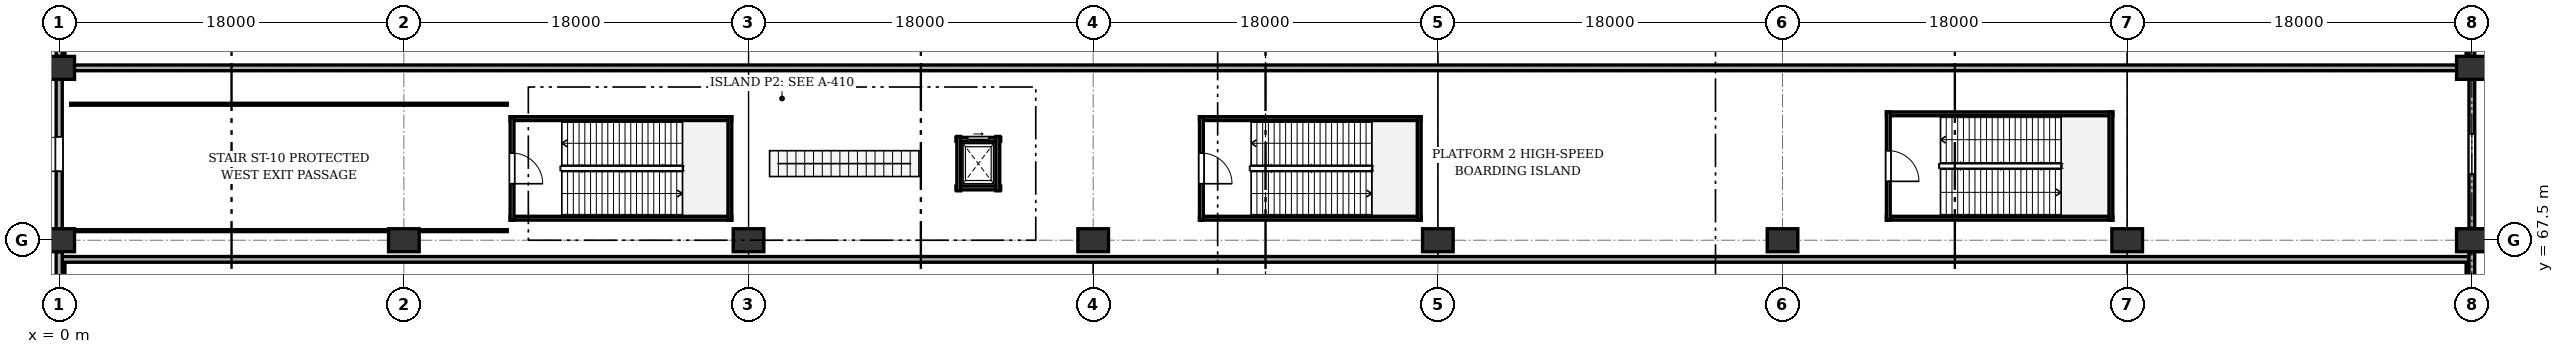
"""IFC4 building model, lengths in metres.
Left out: names, types, materials, properties, quantities, classifications, styles, units other than length and angle.
Written with IfcOpenShell. Run it as: python <this file> out.ifc"""

import sys

from ifc_helpers import new_model, si_unit, direction, frame, frame_2d, origin, origin_2d, place, context, subcontext, project, spatial, rectangle, extrude, element, fill, save


model = new_model("IFC4")
c1 = context("Model", 3, precision=1e-05, world=origin(), true_north=direction((0.0, 1.0)))
c2 = subcontext(c1, "Body", "Model", "MODEL_VIEW")
j1 = project(units=[si_unit("LENGTHUNIT", "METRE"), si_unit("PLANEANGLEUNIT", "RADIAN")], contexts=[c1])
p1 = place(None, origin())
s1 = spatial("IfcSite", under=j1, at=p1, CompositionType="ELEMENT")
p2 = place(p1, origin())
s2 = spatial("IfcBuilding", under=s1, at=p2, CompositionType="ELEMENT")
p3 = place(p2, origin())
s3 = spatial("IfcBuildingStorey", under=s2, at=p3, CompositionType="ELEMENT", Elevation=0.0)
for number, where, z_axis, x_axis in (
    (1, (0.0, 67.5, 0.0), (0.0, 0.0, 1.0), (1.0, 0.0, 0.0)),
    (2, (0.0, 76.5, 0.0), (0.0, 0.0, 1.0), (1.0, 0.0, 0.0)),
    (3, (18.0, 67.5, 0.0), (0.0, 0.0, 1.0), (1.0, 0.0, 0.0)),
    (4, (36.0, 67.5, 0.0), (0.0, 0.0, 1.0), (1.0, 0.0, 0.0)),
    (5, (54.0, 67.5, 0.0), (0.0, 0.0, 1.0), (1.0, 0.0, 0.0)),
    (6, (72.0, 67.5, 0.0), (0.0, 0.0, 1.0), (1.0, 0.0, 0.0)),
    (7, (90.0, 67.5, 0.0), (0.0, 0.0, 1.0), (1.0, 0.0, 0.0)),
    (8, (108.0, 67.5, 0.0), (0.0, 0.0, 1.0), (1.0, 0.0, 0.0)),
    (9, (126.0, 67.5, 0.0), (0.0, 0.0, 1.0), (1.0, 0.0, 0.0)),
    (10, (126.0, 76.5, 0.0), (0.0, 0.0, 1.0), (1.0, 0.0, 0.0)),
):
    element("IfcColumn", number, at=place(p3, frame(where, z_axis=z_axis, x_axis=x_axis)), inside=s3, PredefinedType="COLUMN", context=c2, shape_type="SweptSolid", body=[
        extrude(rectangle(XDim=1.6, YDim=1.2, at=origin_2d()), origin(), (0.0, 0.0, 1.0), 6.6),
    ])
p4 = place(p3, frame((0.15, 62.5, -1.25), z_axis=(0.0, 0.0, 1.0), x_axis=(0.0, 1.0, 0.0)))
e11 = element("IfcWall", 11, at=p4, inside=s3, PredefinedType="SOLIDWALL", context=c2, shape_type="SweptSolid", body=[
    extrude(rectangle(XDim=4.0, YDim=0.3, at=frame_2d((2.0, 0.0))), origin(), (0.0, 0.0, 1.0), 1.23),
])
p5 = place(p3, frame((0.15, 76.5, -1.25), z_axis=(0.0, 0.0, 1.0), x_axis=(0.0, 1.0, 0.0)))
e12 = element("IfcWall", 12, at=p5, inside=s3, PredefinedType="SOLIDWALL", context=c2, shape_type="SweptSolid", body=[
    extrude(rectangle(XDim=18.0, YDim=0.3, at=frame_2d((9.0, 0.0))), origin(), (0.0, 0.0, 1.0), 0.52),
])
p6 = place(p3, frame((125.85, 62.5, -1.25), z_axis=(0.0, 0.0, 1.0), x_axis=(0.0, 1.0, 0.0)))
e13 = element("IfcWall", 13, at=p6, inside=s3, PredefinedType="SOLIDWALL", context=c2, shape_type="SweptSolid", body=[
    extrude(rectangle(XDim=4.0, YDim=0.3, at=frame_2d((2.0, 0.0))), origin(), (0.0, 0.0, 1.0), 1.23),
])
p7 = place(p3, frame((125.85, 76.5, -1.25), z_axis=(0.0, 0.0, 1.0), x_axis=(0.0, 1.0, 0.0)))
e14 = element("IfcWall", 14, at=p7, inside=s3, PredefinedType="SOLIDWALL", context=c2, shape_type="SweptSolid", body=[
    extrude(rectangle(XDim=18.0, YDim=0.3, at=frame_2d((9.0, 0.0))), origin(), (0.0, 0.0, 1.0), 0.52),
])
for number, where, z_axis, x_axis in (
    (15, (0.15, 66.5, -1.25), (0.0, 0.0, 1.0), (1.0, 0.0, 0.0)),
    (16, (0.15, 76.5, -1.25), (0.0, 0.0, 1.0), (1.0, 0.0, 0.0)),
):
    element("IfcWall", number, at=place(p3, frame(where, z_axis=z_axis, x_axis=x_axis)), inside=s3, PredefinedType="SOLIDWALL", context=c2, shape_type="SweptSolid", body=[
        extrude(rectangle(XDim=125.7, YDim=0.3, at=frame_2d((62.85, 0.0))), origin(), (0.0, 0.0, 1.0), 0.87),
    ])
p8 = place(p3, frame((0.0, 54.6, 0.0), z_axis=(0.0, 0.0, 1.0), x_axis=(0.0, 1.0, 0.0)))
e17 = element("IfcWall", 17, at=p8, inside=s3, PredefinedType="SOLIDWALL", context=c2, shape_type="SweptSolid", body=[
    extrude(rectangle(XDim=12.3, YDim=0.32, at=frame_2d((6.15, 0.0))), origin(), (0.0, 0.0, 1.0), 5.495),
])
p9 = place(p8, frame((3.167, 0.0, 0.0)))
e18 = element("IfcOpeningElement", 18, at=p9, cuts=e17, PredefinedType="OPENING", context=c2, shape_type="SweptSolid", body=[
    extrude(rectangle(XDim=2.0, YDim=2.4, at=frame_2d((1.0, 1.2))), frame((0.0, 0.17, 0.0), z_axis=(0.0, -1.0, 0.0), x_axis=(1.0, 0.0, 0.0)), (0.0, 0.0, 1.0), 0.34),
])
p10 = place(p8, frame((7.333, 0.0, 0.95)))
e19 = element("IfcOpeningElement", 19, at=p10, cuts=e17, PredefinedType="OPENING", context=c2, shape_type="SweptSolid", body=[
    extrude(rectangle(XDim=1.6, YDim=1.9, at=frame_2d((0.8, 0.95))), frame((0.0, 0.17, 0.0), z_axis=(0.0, -1.0, 0.0), x_axis=(1.0, 0.0, 0.0)), (0.0, 0.0, 1.0), 0.34),
])
p11 = place(p3, frame((0.0, 68.1, 0.0), z_axis=(0.0, 0.0, 1.0), x_axis=(0.0, 1.0, 0.0)))
e20 = element("IfcWall", 20, at=p11, inside=s3, PredefinedType="SOLIDWALL", context=c2, shape_type="SweptSolid", body=[
    extrude(rectangle(XDim=7.8, YDim=0.32, at=frame_2d((3.9, 0.0))), origin(), (0.0, 0.0, 1.0), 5.495),
])
p12 = place(p11, frame((3.0, 0.0, 0.0)))
e21 = element("IfcOpeningElement", 21, at=p12, cuts=e20, PredefinedType="OPENING", context=c2, shape_type="SweptSolid", body=[
    extrude(rectangle(XDim=1.8, YDim=2.35, at=frame_2d((0.9, 1.175))), frame((0.0, 0.17, 0.0), z_axis=(0.0, -1.0, 0.0), x_axis=(1.0, 0.0, 0.0)), (0.0, 0.0, 1.0), 0.34),
])
p13 = place(p3, frame((0.0, 77.1, 0.0), z_axis=(0.0, 0.0, 1.0), x_axis=(0.0, 1.0, 0.0)))
e22 = element("IfcWall", 22, at=p13, inside=s3, PredefinedType="SOLIDWALL", context=c2, shape_type="SweptSolid", body=[
    extrude(rectangle(XDim=7.8, YDim=0.32, at=frame_2d((3.9, 0.0))), origin(), (0.0, 0.0, 1.0), 5.495),
])
p14 = place(p13, frame((2.4, 0.0, 0.95)))
e23 = element("IfcOpeningElement", 23, at=p14, cuts=e22, PredefinedType="OPENING", context=c2, shape_type="SweptSolid", body=[
    extrude(rectangle(XDim=3.0, YDim=2.1, at=frame_2d((1.5, 1.05))), frame((0.0, 0.17, 0.0), z_axis=(0.0, -1.0, 0.0), x_axis=(1.0, 0.0, 0.0)), (0.0, 0.0, 1.0), 0.34),
])
p15 = place(p3, frame((126.0, 66.9, 0.0), z_axis=(0.0, 0.0, 1.0), x_axis=(0.0, -1.0, 0.0)))
e24 = element("IfcWall", 24, at=p15, inside=s3, PredefinedType="SOLIDWALL", context=c2, shape_type="SweptSolid", body=[
    extrude(rectangle(XDim=12.3, YDim=0.3, at=frame_2d((6.15, 0.0))), origin(), (0.0, 0.0, 1.0), 5.495),
])
p16 = place(p15, frame((2.817, 0.0, 0.95)))
e25 = element("IfcOpeningElement", 25, at=p16, cuts=e24, PredefinedType="OPENING", context=c2, shape_type="SweptSolid", body=[
    extrude(rectangle(XDim=2.7, YDim=2.1, at=frame_2d((1.35, 1.05))), frame((0.0, 0.16, 0.0), z_axis=(0.0, -1.0, 0.0), x_axis=(1.0, 0.0, 0.0)), (0.0, 0.0, 1.0), 0.32),
])
p17 = place(p15, frame((6.933, 0.0, 0.95)))
e26 = element("IfcOpeningElement", 26, at=p17, cuts=e24, PredefinedType="OPENING", context=c2, shape_type="SweptSolid", body=[
    extrude(rectangle(XDim=2.4, YDim=2.1, at=frame_2d((1.2, 1.05))), frame((0.0, 0.16, 0.0), z_axis=(0.0, -1.0, 0.0), x_axis=(1.0, 0.0, 0.0)), (0.0, 0.0, 1.0), 0.32),
])
p18 = place(p3, frame((126.0, 75.9, 0.0), z_axis=(0.0, 0.0, 1.0), x_axis=(0.0, -1.0, 0.0)))
e27 = element("IfcWall", 27, at=p18, inside=s3, PredefinedType="SOLIDWALL", context=c2, shape_type="SweptSolid", body=[
    extrude(rectangle(XDim=7.8, YDim=0.3, at=frame_2d((3.9, 0.0))), origin(), (0.0, 0.0, 1.0), 5.495),
])
p19 = place(p18, frame((2.85, 0.0, 0.95)))
e28 = element("IfcOpeningElement", 28, at=p19, cuts=e27, PredefinedType="OPENING", context=c2, shape_type="SweptSolid", body=[
    extrude(rectangle(XDim=2.1, YDim=2.0, at=frame_2d((1.05, 1.0))), frame((0.0, 0.16, 0.0), z_axis=(0.0, -1.0, 0.0), x_axis=(1.0, 0.0, 0.0)), (0.0, 0.0, 1.0), 0.32),
])
p20 = place(p3, frame((126.0, 84.9, 0.0), z_axis=(0.0, 0.0, 1.0), x_axis=(0.0, -1.0, 0.0)))
e29 = element("IfcWall", 29, at=p20, inside=s3, PredefinedType="SOLIDWALL", context=c2, shape_type="SweptSolid", body=[
    extrude(rectangle(XDim=7.8, YDim=0.3, at=frame_2d((3.9, 0.0))), origin(), (0.0, 0.0, 1.0), 5.495),
])
p21 = place(p20, frame((3.0, 0.0, 0.95)))
e30 = element("IfcOpeningElement", 30, at=p21, cuts=e29, PredefinedType="OPENING", context=c2, shape_type="SweptSolid", body=[
    extrude(rectangle(XDim=1.8, YDim=2.0, at=frame_2d((0.9, 1.0))), frame((0.0, 0.16, 0.0), z_axis=(0.0, -1.0, 0.0), x_axis=(1.0, 0.0, 0.0)), (0.0, 0.0, 1.0), 0.32),
])
for number, where, z_axis, x_axis in (
    (31, (23.55, 68.65, 0.0), (0.0, 0.0, 1.0), (1.0, 0.0, 0.0)),
    (32, (35.125, 73.85, 0.0), (0.0, 0.0, 1.0), (-1.0, 0.0, 0.0)),
):
    element("IfcWall", number, at=place(p3, frame(where, z_axis=z_axis, x_axis=x_axis)), inside=s3, PredefinedType="SOLIDWALL", context=c2, shape_type="SweptSolid", body=[
        extrude(rectangle(XDim=11.575, YDim=0.2, at=frame_2d((5.788, 0.0))), origin(), (0.0, 0.0, 1.0), 6.32),
    ])
p22 = place(p3, frame((35.025, 68.55, 0.0), z_axis=(0.0, 0.0, 1.0), x_axis=(0.0, 1.0, 0.0)))
e33 = element("IfcWall", 33, at=p22, inside=s3, PredefinedType="SOLIDWALL", context=c2, shape_type="SweptSolid", body=[
    extrude(rectangle(XDim=5.4, YDim=0.2, at=frame_2d((2.7, 0.0))), origin(), (0.0, 0.0, 1.0), 6.32),
])
p23 = place(p3, frame((23.65, 73.95, 0.0), z_axis=(0.0, 0.0, 1.0), x_axis=(0.0, -1.0, 0.0)))
e34 = element("IfcWall", 34, at=p23, inside=s3, PredefinedType="SOLIDWALL", context=c2, shape_type="SweptSolid", body=[
    extrude(rectangle(XDim=5.4, YDim=0.2, at=frame_2d((2.7, 0.0))), origin(), (0.0, 0.0, 1.0), 4.4),
])
p24 = place(p23, frame((1.9, 0.0, 0.0)))
e35 = element("IfcOpeningElement", 35, at=p24, cuts=e34, PredefinedType="OPENING", context=c2, shape_type="SweptSolid", body=[
    extrude(rectangle(XDim=1.6, YDim=2.15, at=frame_2d((0.8, 1.075))), frame((0.0, 0.11, 0.0), z_axis=(0.0, -1.0, 0.0), x_axis=(1.0, 0.0, 0.0)), (0.0, 0.0, 1.0), 0.22),
])
for number, where, z_axis, x_axis in (
    (36, (59.55, 68.65, 0.0), (0.0, 0.0, 1.0), (1.0, 0.0, 0.0)),
    (37, (71.125, 73.85, 0.0), (0.0, 0.0, 1.0), (-1.0, 0.0, 0.0)),
):
    element("IfcWall", number, at=place(p3, frame(where, z_axis=z_axis, x_axis=x_axis)), inside=s3, PredefinedType="SOLIDWALL", context=c2, shape_type="SweptSolid", body=[
        extrude(rectangle(XDim=11.575, YDim=0.2, at=frame_2d((5.788, 0.0))), origin(), (0.0, 0.0, 1.0), 6.32),
    ])
p25 = place(p3, frame((71.025, 68.55, 0.0), z_axis=(0.0, 0.0, 1.0), x_axis=(0.0, 1.0, 0.0)))
e38 = element("IfcWall", 38, at=p25, inside=s3, PredefinedType="SOLIDWALL", context=c2, shape_type="SweptSolid", body=[
    extrude(rectangle(XDim=5.4, YDim=0.2, at=frame_2d((2.7, 0.0))), origin(), (0.0, 0.0, 1.0), 6.32),
])
p26 = place(p3, frame((59.65, 73.95, 0.0), z_axis=(0.0, 0.0, 1.0), x_axis=(0.0, -1.0, 0.0)))
e39 = element("IfcWall", 39, at=p26, inside=s3, PredefinedType="SOLIDWALL", context=c2, shape_type="SweptSolid", body=[
    extrude(rectangle(XDim=5.4, YDim=0.2, at=frame_2d((2.7, 0.0))), origin(), (0.0, 0.0, 1.0), 4.4),
])
p27 = place(p26, frame((1.9, 0.0, 0.0)))
e40 = element("IfcOpeningElement", 40, at=p27, cuts=e39, PredefinedType="OPENING", context=c2, shape_type="SweptSolid", body=[
    extrude(rectangle(XDim=1.6, YDim=2.15, at=frame_2d((0.8, 1.075))), frame((0.0, 0.11, 0.0), z_axis=(0.0, -1.0, 0.0), x_axis=(1.0, 0.0, 0.0)), (0.0, 0.0, 1.0), 0.22),
])
for number, where, z_axis, x_axis in (
    (41, (95.425, 68.65, 0.0), (0.0, 0.0, 1.0), (1.0, 0.0, 0.0)),
    (42, (107.25, 74.1, 0.0), (0.0, 0.0, 1.0), (-1.0, 0.0, 0.0)),
):
    element("IfcWall", number, at=place(p3, frame(where, z_axis=z_axis, x_axis=x_axis)), inside=s3, PredefinedType="SOLIDWALL", context=c2, shape_type="SweptSolid", body=[
        extrude(rectangle(XDim=11.825, YDim=0.2, at=frame_2d((5.913, 0.0))), origin(), (0.0, 0.0, 1.0), 6.32),
    ])
p28 = place(p3, frame((107.15, 68.55, 0.0), z_axis=(0.0, 0.0, 1.0), x_axis=(0.0, 1.0, 0.0)))
e43 = element("IfcWall", 43, at=p28, inside=s3, PredefinedType="SOLIDWALL", context=c2, shape_type="SweptSolid", body=[
    extrude(rectangle(XDim=5.65, YDim=0.2, at=frame_2d((2.825, 0.0))), origin(), (0.0, 0.0, 1.0), 6.32),
])
p29 = place(p3, frame((95.525, 74.2, 0.0), z_axis=(0.0, 0.0, 1.0), x_axis=(0.0, -1.0, 0.0)))
e44 = element("IfcWall", 44, at=p29, inside=s3, PredefinedType="SOLIDWALL", context=c2, shape_type="SweptSolid", body=[
    extrude(rectangle(XDim=5.65, YDim=0.2, at=frame_2d((2.825, 0.0))), origin(), (0.0, 0.0, 1.0), 4.4),
])
p30 = place(p29, frame((2.025, 0.0, 0.0)))
e45 = element("IfcOpeningElement", 45, at=p30, cuts=e44, PredefinedType="OPENING", context=c2, shape_type="SweptSolid", body=[
    extrude(rectangle(XDim=1.6, YDim=2.15, at=frame_2d((0.8, 1.075))), frame((0.0, 0.11, 0.0), z_axis=(0.0, -1.0, 0.0), x_axis=(1.0, 0.0, 0.0)), (0.0, 0.0, 1.0), 0.22),
])
p31 = place(p3, frame((46.83, 70.23, 0.0), z_axis=(0.0, 0.0, 1.0), x_axis=(1.0, 0.0, 0.0)))
e46 = element("IfcWall", 46, at=p31, inside=s3, PredefinedType="SOLIDWALL", context=c2, shape_type="SweptSolid", body=[
    extrude(rectangle(XDim=2.34, YDim=0.2, at=frame_2d((1.17, 0.0))), origin(), (0.0, 0.0, 1.0), 4.4),
])
p32 = place(p3, frame((49.17, 72.77, 0.0), z_axis=(0.0, 0.0, 1.0), x_axis=(-1.0, 0.0, 0.0)))
e47 = element("IfcWall", 47, at=p32, inside=s3, PredefinedType="SOLIDWALL", context=c2, shape_type="SweptSolid", body=[
    extrude(rectangle(XDim=2.34, YDim=0.2, at=frame_2d((1.17, 0.0))), origin(), (0.0, 0.0, 1.0), 4.4),
])
p33 = place(p32, frame((0.62, 0.0, 0.0)))
e48 = element("IfcOpeningElement", 48, at=p33, cuts=e47, PredefinedType="OPENING", context=c2, shape_type="SweptSolid", body=[
    extrude(rectangle(XDim=1.1, YDim=2.15, at=frame_2d((0.55, 1.075))), frame((0.0, 0.11, 0.0), z_axis=(0.0, -1.0, 0.0), x_axis=(1.0, 0.0, 0.0)), (0.0, 0.0, 1.0), 0.22),
])
for number, where, z_axis, x_axis in (
    (49, (46.98, 72.92, 0.0), (0.0, 0.0, 1.0), (0.0, -1.0, 0.0)),
    (50, (49.02, 70.08, 0.0), (0.0, 0.0, 1.0), (0.0, 1.0, 0.0)),
):
    element("IfcWall", number, at=place(p3, frame(where, z_axis=z_axis, x_axis=x_axis)), inside=s3, PredefinedType="SOLIDWALL", context=c2, shape_type="SweptSolid", body=[
        extrude(rectangle(XDim=2.84, YDim=0.2, at=frame_2d((1.42, 0.0))), origin(), (0.0, 0.0, 1.0), 4.4),
    ])
for number, where, z_axis, x_axis in (
    (51, (23.4, 68.0, 0.0), (0.0, 0.0, 1.0), (-1.0, 0.0, 0.0)),
    (52, (0.6, 74.6, 0.0), (0.0, 0.0, 1.0), (1.0, 0.0, 0.0)),
):
    element("IfcWall", number, at=place(p3, frame(where, z_axis=z_axis, x_axis=x_axis)), inside=s3, PredefinedType="PARTITIONING", context=c2, shape_type="SweptSolid", body=[
        extrude(rectangle(XDim=22.8, YDim=0.1, at=frame_2d((11.4, 0.0))), origin(), (0.0, 0.0, 1.0), 4.4),
    ])
p34 = place(p12, origin())
e53 = element("IfcDoor", 53, at=p34, inside=s3, OperationType="SINGLE_SWING_LEFT", PredefinedType="DOOR", context=c2, shape_type="SweptSolid", body=[
    extrude(rectangle(XDim=1.8, YDim=2.35, at=frame_2d((0.9, 1.175))), frame((0.0, 0.025, 0.0), z_axis=(0.0, -1.0, 0.0), x_axis=(1.0, 0.0, 0.0)), (0.0, 0.0, 1.0), 0.05),
])
fill(e21, e53)
p35 = place(p19, origin())
e54 = element("IfcWindow", 54, at=p35, inside=s3, PartitioningType="SINGLE_PANEL", PredefinedType="WINDOW", context=c2, shape_type="SweptSolid", body=[
    extrude(rectangle(XDim=2.1, YDim=2.0, at=frame_2d((1.05, 1.0))), frame((0.0, 0.03, 0.0), z_axis=(0.0, -1.0, 0.0), x_axis=(1.0, 0.0, 0.0)), (0.0, 0.0, 1.0), 0.06),
])
fill(e28, e54)
p36 = place(p24, origin())
e55 = element("IfcDoor", 55, at=p36, inside=s3, OperationType="SINGLE_SWING_RIGHT", PredefinedType="DOOR", context=c2, shape_type="SweptSolid", body=[
    extrude(rectangle(XDim=1.6, YDim=2.15, at=frame_2d((0.8, 1.075))), frame((0.0, 0.025, 0.0), z_axis=(0.0, -1.0, 0.0), x_axis=(1.0, 0.0, 0.0)), (0.0, 0.0, 1.0), 0.05),
])
fill(e35, e55)
p37 = place(p27, origin())
e56 = element("IfcDoor", 56, at=p37, inside=s3, OperationType="SINGLE_SWING_RIGHT", PredefinedType="DOOR", context=c2, shape_type="SweptSolid", body=[
    extrude(rectangle(XDim=1.6, YDim=2.15, at=frame_2d((0.8, 1.075))), frame((0.0, 0.025, 0.0), z_axis=(0.0, -1.0, 0.0), x_axis=(1.0, 0.0, 0.0)), (0.0, 0.0, 1.0), 0.05),
])
fill(e40, e56)
p38 = place(p30, origin())
e57 = element("IfcDoor", 57, at=p38, inside=s3, OperationType="SINGLE_SWING_RIGHT", PredefinedType="DOOR", context=c2, shape_type="SweptSolid", body=[
    extrude(rectangle(XDim=1.6, YDim=2.15, at=frame_2d((0.8, 1.075))), frame((0.0, 0.025, 0.0), z_axis=(0.0, -1.0, 0.0), x_axis=(1.0, 0.0, 0.0)), (0.0, 0.0, 1.0), 0.05),
])
fill(e45, e57)
p39 = place(p33, origin())
e58 = element("IfcDoor", 58, at=p39, inside=s3, OperationType="SLIDING_TO_LEFT", PredefinedType="DOOR", context=c2, shape_type="SweptSolid", body=[
    extrude(rectangle(XDim=1.1, YDim=2.15, at=frame_2d((0.55, 1.075))), frame((0.0, 0.025, 0.0), z_axis=(0.0, -1.0, 0.0), x_axis=(1.0, 0.0, 0.0)), (0.0, 0.0, 1.0), 0.05),
])
fill(e48, e58)
save(model, sys.argv[1])
